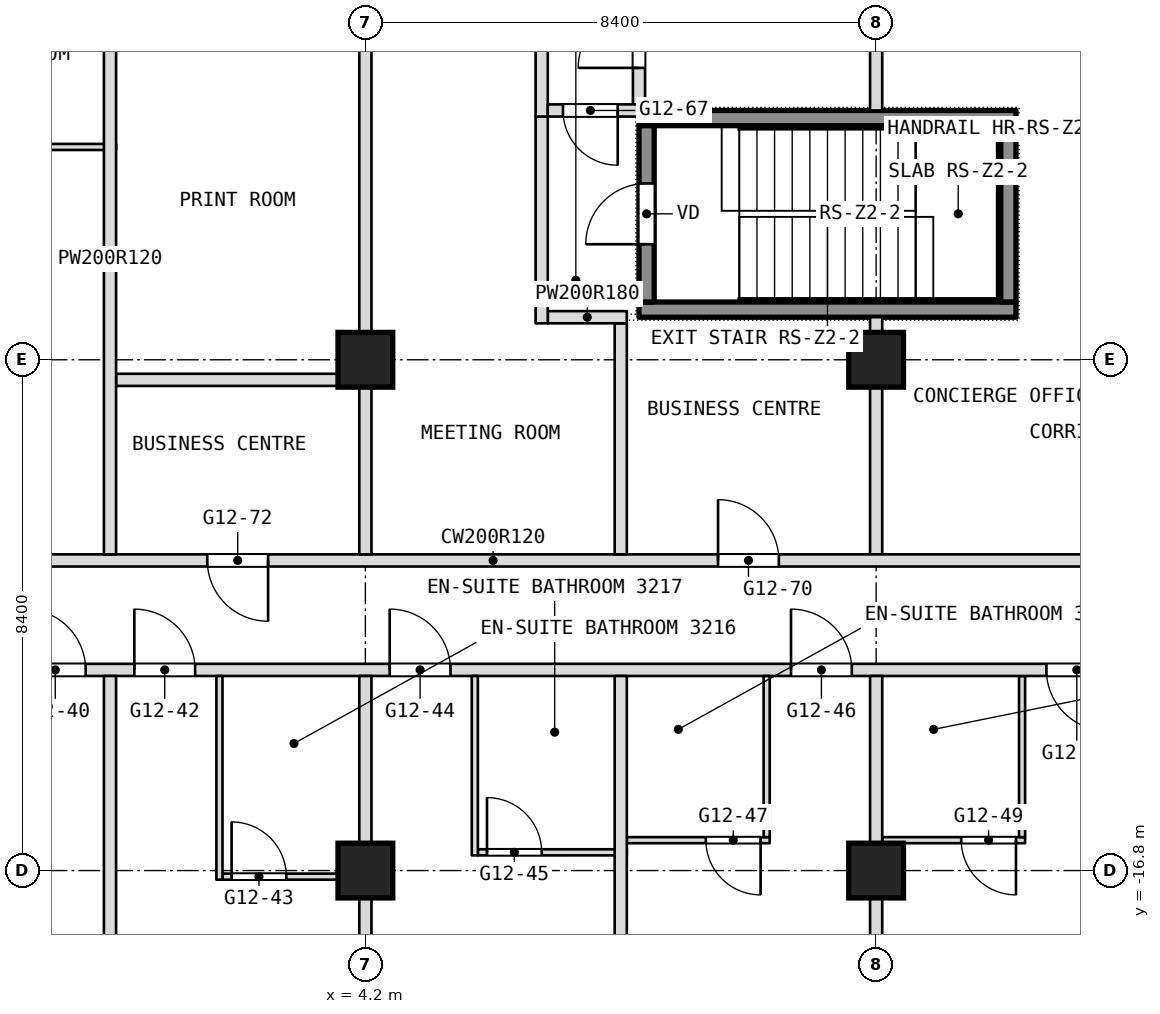
"""IFC4 building model, lengths in metres.
Left out: names, types, materials, properties, quantities, classifications, styles, units other than length and angle.
Written with IfcOpenShell. Run it as: python <this file> out.ifc"""

import sys

from ifc_helpers import new_model, si_unit, direction, frame, frame_2d, origin, origin_2d, place, context, subcontext, project, spatial, rectangle, extrude, element, fill, save


model = new_model("IFC4")
c1 = context("Model", 3, precision=1e-05, world=origin(), true_north=direction((0.0, 1.0)))
c2 = subcontext(c1, "Body", "Model", "MODEL_VIEW")
j1 = project(units=[si_unit("LENGTHUNIT", "METRE"), si_unit("PLANEANGLEUNIT", "RADIAN")], contexts=[c1])
p1 = place(None, origin())
s1 = spatial("IfcSite", under=j1, at=p1, CompositionType="ELEMENT")
p2 = place(p1, origin())
s2 = spatial("IfcBuilding", under=s1, at=p2, CompositionType="ELEMENT")
p3 = place(p2, frame((0.0, 0.0, 140.9)))
s3 = spatial("IfcBuildingStorey", under=s2, at=p3, CompositionType="ELEMENT", Elevation=140.9)
for number, where, z_axis, x_axis in (
    (1, (4.2, -16.8, 0.0), (0.0, 0.0, 1.0), (1.0, 0.0, 0.0)),
    (2, (4.2, -8.4, 0.0), (0.0, 0.0, 1.0), (1.0, 0.0, 0.0)),
    (3, (12.6, -16.8, 0.0), (0.0, 0.0, 1.0), (1.0, 0.0, 0.0)),
    (4, (12.6, -8.4, 0.0), (0.0, 0.0, 1.0), (1.0, 0.0, 0.0)),
):
    element("IfcColumn", number, at=place(p3, frame(where, z_axis=z_axis, x_axis=x_axis)), inside=s3, PredefinedType="COLUMN", context=c2, shape_type="SweptSolid", body=[
        extrude(rectangle(XDim=0.9, YDim=0.9, at=origin_2d()), origin(), (0.0, 0.0, 1.0), 3.6),
    ])
p4 = place(p3, frame((1.85, -16.9, 0.0), z_axis=(0.0, 0.0, 1.0), x_axis=(1.0, 0.0, 0.0)))
e5 = element("IfcWall", 5, at=p4, inside=s3, PredefinedType="PARTITIONING", context=c2, shape_type="SweptSolid", body=[
    extrude(rectangle(XDim=2.45, YDim=0.1, at=frame_2d((1.225, 0.0))), origin(), (0.0, 0.0, 1.0), 2.89),
])
p5 = place(p4, frame((0.15, 0.0, 0.0)))
e6 = element("IfcOpeningElement", 6, at=p5, cuts=e5, PredefinedType="OPENING", context=c2, shape_type="SweptSolid", body=[
    extrude(rectangle(XDim=0.9, YDim=2.1, at=frame_2d((0.45, 1.05))), frame((0.0, 0.05, 0.0), z_axis=(0.0, -1.0, 0.0), x_axis=(1.0, 0.0, 0.0)), (0.0, 0.0, 1.0), 0.1),
])
p6 = place(p3, frame((6.05, -16.5, 0.0), z_axis=(0.0, 0.0, 1.0), x_axis=(1.0, 0.0, 0.0)))
e7 = element("IfcWall", 7, at=p6, inside=s3, PredefinedType="PARTITIONING", context=c2, shape_type="SweptSolid", body=[
    extrude(rectangle(XDim=2.45, YDim=0.1, at=frame_2d((1.225, 0.0))), origin(), (0.0, 0.0, 1.0), 3.34),
])
p7 = place(p6, frame((0.15, 0.0, 0.0)))
e8 = element("IfcOpeningElement", 8, at=p7, cuts=e7, PredefinedType="OPENING", context=c2, shape_type="SweptSolid", body=[
    extrude(rectangle(XDim=0.9, YDim=2.1, at=frame_2d((0.45, 1.05))), frame((0.0, 0.05, 0.0), z_axis=(0.0, -1.0, 0.0), x_axis=(1.0, 0.0, 0.0)), (0.0, 0.0, 1.0), 0.1),
])
p8 = place(p3, frame((8.5, -16.3, 0.0), z_axis=(0.0, 0.0, 1.0), x_axis=(1.0, 0.0, 0.0)))
e9 = element("IfcWall", 9, at=p8, inside=s3, PredefinedType="PARTITIONING", context=c2, shape_type="SweptSolid", body=[
    extrude(rectangle(XDim=2.35, YDim=0.1, at=frame_2d((1.175, 0.0))), origin(), (0.0, 0.0, 1.0), 3.34),
])
p9 = place(p8, frame((1.3, 0.0, 0.0)))
e10 = element("IfcOpeningElement", 10, at=p9, cuts=e9, PredefinedType="OPENING", context=c2, shape_type="SweptSolid", body=[
    extrude(rectangle(XDim=0.9, YDim=2.1, at=frame_2d((0.45, 1.05))), frame((0.0, 0.05, 0.0), z_axis=(0.0, -1.0, 0.0), x_axis=(1.0, 0.0, 0.0)), (0.0, 0.0, 1.0), 0.1),
])
p10 = place(p3, frame((12.7, -16.3, 0.0), z_axis=(0.0, 0.0, 1.0), x_axis=(1.0, 0.0, 0.0)))
e11 = element("IfcWall", 11, at=p10, inside=s3, PredefinedType="PARTITIONING", context=c2, shape_type="SweptSolid", body=[
    extrude(rectangle(XDim=2.35, YDim=0.1, at=frame_2d((1.175, 0.0))), origin(), (0.0, 0.0, 1.0), 3.34),
])
p11 = place(p10, frame((1.3, 0.0, 0.0)))
e12 = element("IfcOpeningElement", 12, at=p11, cuts=e11, PredefinedType="OPENING", context=c2, shape_type="SweptSolid", body=[
    extrude(rectangle(XDim=0.9, YDim=2.1, at=frame_2d((0.45, 1.05))), frame((0.0, 0.05, 0.0), z_axis=(0.0, -1.0, 0.0), x_axis=(1.0, 0.0, 0.0)), (0.0, 0.0, 1.0), 0.1),
])
p12 = place(p3, frame((15.0, -16.25, 0.0), z_axis=(0.0, 0.0, 1.0), x_axis=(0.0, 1.0, 0.0)))
e13 = element("IfcWall", 13, at=p12, inside=s3, PredefinedType="PARTITIONING", context=c2, shape_type="SweptSolid", body=[
    extrude(rectangle(XDim=2.65, YDim=0.1, at=frame_2d((1.325, 0.0))), origin(), (0.0, 0.0, 1.0), 3.34),
])
p13 = place(p3, frame((-3.2, -13.5, 0.0), z_axis=(0.0, 0.0, 1.0), x_axis=(1.0, 0.0, 0.0)))
e14 = element("IfcWall", 14, at=p13, inside=s3, PredefinedType="PARTITIONING", context=c2, shape_type="SweptSolid", body=[
    extrude(rectangle(XDim=19.9, YDim=0.2, at=frame_2d((9.95, 0.0))), origin(), (0.0, 0.0, 1.0), 3.34),
])
p14 = place(p13, frame((1.8, 0.0, 0.0)))
e15 = element("IfcOpeningElement", 15, at=p14, cuts=e14, PredefinedType="OPENING", context=c2, shape_type="SweptSolid", body=[
    extrude(rectangle(XDim=1.0, YDim=2.1, at=frame_2d((0.5, 1.05))), frame((0.0, 0.1, 0.0), z_axis=(0.0, -1.0, 0.0), x_axis=(1.0, 0.0, 0.0)), (0.0, 0.0, 1.0), 0.2),
])
p15 = place(p13, frame((3.6, 0.0, 0.0)))
e16 = element("IfcOpeningElement", 16, at=p15, cuts=e14, PredefinedType="OPENING", context=c2, shape_type="SweptSolid", body=[
    extrude(rectangle(XDim=1.0, YDim=2.1, at=frame_2d((0.5, 1.05))), frame((0.0, 0.1, 0.0), z_axis=(0.0, -1.0, 0.0), x_axis=(1.0, 0.0, 0.0)), (0.0, 0.0, 1.0), 0.2),
])
p16 = place(p13, frame((7.8, 0.0, 0.0)))
e17 = element("IfcOpeningElement", 17, at=p16, cuts=e14, PredefinedType="OPENING", context=c2, shape_type="SweptSolid", body=[
    extrude(rectangle(XDim=1.0, YDim=2.1, at=frame_2d((0.5, 1.05))), frame((0.0, 0.1, 0.0), z_axis=(0.0, -1.0, 0.0), x_axis=(1.0, 0.0, 0.0)), (0.0, 0.0, 1.0), 0.2),
])
p17 = place(p13, frame((14.4, 0.0, 0.0)))
e18 = element("IfcOpeningElement", 18, at=p17, cuts=e14, PredefinedType="OPENING", context=c2, shape_type="SweptSolid", body=[
    extrude(rectangle(XDim=1.0, YDim=2.1, at=frame_2d((0.5, 1.05))), frame((0.0, 0.1, 0.0), z_axis=(0.0, -1.0, 0.0), x_axis=(1.0, 0.0, 0.0)), (0.0, 0.0, 1.0), 0.2),
])
p18 = place(p13, frame((18.6, 0.0, 0.0)))
e19 = element("IfcOpeningElement", 19, at=p18, cuts=e14, PredefinedType="OPENING", context=c2, shape_type="SweptSolid", body=[
    extrude(rectangle(XDim=1.0, YDim=2.1, at=frame_2d((0.5, 1.05))), frame((0.0, 0.1, 0.0), z_axis=(0.0, -1.0, 0.0), x_axis=(1.0, 0.0, 0.0)), (0.0, 0.0, 1.0), 0.2),
])
p19 = place(p3, frame((12.6, -21.175, 0.0), z_axis=(0.0, 0.0, 1.0), x_axis=(0.0, 1.0, 0.0)))
e20 = element("IfcWall", 20, at=p19, inside=s3, PredefinedType="PARTITIONING", context=c2, shape_type="SweptSolid", body=[
    extrude(rectangle(XDim=7.575, YDim=0.2, at=frame_2d((3.788, 0.0))), origin(), (0.0, 0.0, 1.0), 3.34),
])
p20 = place(p3, frame((12.6, -11.6, 0.0), z_axis=(0.0, 0.0, 1.0), x_axis=(0.0, 1.0, 0.0)))
e21 = element("IfcWall", 21, at=p20, inside=s3, PredefinedType="PARTITIONING", context=c2, shape_type="SweptSolid", body=[
    extrude(rectangle(XDim=3.9, YDim=0.2, at=frame_2d((1.95, 0.0))), origin(), (0.0, 0.0, 1.0), 3.34),
])
p21 = place(p3, frame((12.6, -4.3, 0.0), z_axis=(0.0, 0.0, 1.0), x_axis=(0.0, 1.0, 0.0)))
e22 = element("IfcWall", 22, at=p21, inside=s3, PredefinedType="PARTITIONING", context=c2, shape_type="SweptSolid", body=[
    extrude(rectangle(XDim=2.4, YDim=0.2, at=frame_2d((1.2, 0.0))), origin(), (0.0, 0.0, 1.0), 3.34),
])
p22 = place(p3, frame((-4.1, -11.7, 0.0), z_axis=(0.0, 0.0, 1.0), x_axis=(1.0, 0.0, 0.0)))
e23 = element("IfcWall", 23, at=p22, inside=s3, PredefinedType="PARTITIONING", context=c2, shape_type="SweptSolid", body=[
    extrude(rectangle(XDim=20.8, YDim=0.2, at=frame_2d((10.4, 0.0))), origin(), (0.0, 0.0, 1.0), 3.34),
])
p23 = place(p22, frame((14.1, 0.0, 0.0)))
e24 = element("IfcOpeningElement", 24, at=p23, cuts=e23, PredefinedType="OPENING", context=c2, shape_type="SweptSolid", body=[
    extrude(rectangle(XDim=1.0, YDim=2.1, at=frame_2d((0.5, 1.05))), frame((0.0, 0.1, 0.0), z_axis=(0.0, -1.0, 0.0), x_axis=(1.0, 0.0, 0.0)), (0.0, 0.0, 1.0), 0.2),
])
p24 = place(p22, frame((5.7, 0.0, 0.0)))
e25 = element("IfcOpeningElement", 25, at=p24, cuts=e23, PredefinedType="OPENING", context=c2, shape_type="SweptSolid", body=[
    extrude(rectangle(XDim=1.0, YDim=2.1, at=frame_2d((0.5, 1.05))), frame((0.0, 0.1, 0.0), z_axis=(0.0, -1.0, 0.0), x_axis=(1.0, 0.0, 0.0)), (0.0, 0.0, 1.0), 0.2),
])
p25 = place(p3, frame((10.8, -16.25, 0.0), z_axis=(0.0, 0.0, 1.0), x_axis=(0.0, 1.0, 0.0)))
e26 = element("IfcWall", 26, at=p25, inside=s3, PredefinedType="PARTITIONING", context=c2, shape_type="SweptSolid", body=[
    extrude(rectangle(XDim=2.65, YDim=0.1, at=frame_2d((1.325, 0.0))), origin(), (0.0, 0.0, 1.0), 3.34),
])
p26 = place(p3, frame((0.1, -8.73, 0.0), z_axis=(0.0, 0.0, 1.0), x_axis=(1.0, 0.0, 0.0)))
e27 = element("IfcWall", 27, at=p26, inside=s3, PredefinedType="PARTITIONING", context=c2, shape_type="SweptSolid", body=[
    extrude(rectangle(XDim=4.0, YDim=0.2, at=frame_2d((2.0, 0.0))), origin(), (0.0, 0.0, 1.0), 3.34),
])
p27 = place(p3, frame((8.7, -4.3, 0.0), z_axis=(0.0, 0.0, 1.0), x_axis=(0.0, 1.0, 0.0)))
e28 = element("IfcWall", 28, at=p27, inside=s3, PredefinedType="PARTITIONING", context=c2, shape_type="SweptSolid", body=[
    extrude(rectangle(XDim=2.4, YDim=0.2, at=frame_2d((1.2, 0.0))), origin(), (0.0, 0.0, 1.0), 3.34),
])
p28 = place(p27, frame((0.7, 0.0, 0.0)))
e29 = element("IfcOpeningElement", 29, at=p28, cuts=e28, PredefinedType="OPENING", context=c2, shape_type="SweptSolid", body=[
    extrude(rectangle(XDim=1.0, YDim=2.1, at=frame_2d((0.5, 1.05))), frame((0.0, 0.1, 0.0), z_axis=(0.0, -1.0, 0.0), x_axis=(1.0, 0.0, 0.0)), (0.0, 0.0, 1.0), 0.2),
])
p29 = place(p3, frame((8.4, -23.3, 0.0), z_axis=(0.0, 0.0, 1.0), x_axis=(0.0, 1.0, 0.0)))
e30 = element("IfcWall", 30, at=p29, inside=s3, PredefinedType="PARTITIONING", context=c2, shape_type="SweptSolid", body=[
    extrude(rectangle(XDim=9.7, YDim=0.2, at=frame_2d((4.85, 0.0))), origin(), (0.0, 0.0, 1.0), 3.34),
])
p30 = place(p3, frame((8.4, -11.6, 0.0), z_axis=(0.0, 0.0, 1.0), x_axis=(0.0, 1.0, 0.0)))
e31 = element("IfcWall", 31, at=p30, inside=s3, PredefinedType="PARTITIONING", context=c2, shape_type="SweptSolid", body=[
    extrude(rectangle(XDim=3.8, YDim=0.2, at=frame_2d((1.9, 0.0))), origin(), (0.0, 0.0, 1.0), 3.34),
])
p31 = place(p3, frame((7.2, -7.7, 0.0), z_axis=(0.0, 0.0, 1.0), x_axis=(1.0, 0.0, 0.0)))
e32 = element("IfcWall", 32, at=p31, inside=s3, PredefinedType="PARTITIONING", context=c2, shape_type="SweptSolid", body=[
    extrude(rectangle(XDim=1.3, YDim=0.2, at=frame_2d((0.65, 0.0))), origin(), (0.0, 0.0, 1.0), 3.34),
])
p32 = place(p3, frame((7.1, -7.8, 0.0), z_axis=(0.0, 0.0, 1.0), x_axis=(0.0, 1.0, 0.0)))
e33 = element("IfcWall", 33, at=p32, inside=s3, PredefinedType="PARTITIONING", context=c2, shape_type="SweptSolid", body=[
    extrude(rectangle(XDim=3.4, YDim=0.2, at=frame_2d((1.7, 0.0))), origin(), (0.0, 0.0, 1.0), 3.34),
])
p33 = place(p3, frame((7.1, -4.4, 0.0), z_axis=(0.0, 0.0, 1.0), x_axis=(0.0, 1.0, 0.0)))
e34 = element("IfcWall", 34, at=p33, inside=s3, PredefinedType="PARTITIONING", context=c2, shape_type="SweptSolid", body=[
    extrude(rectangle(XDim=2.7, YDim=0.2, at=frame_2d((1.35, 0.0))), origin(), (0.0, 0.0, 1.0), 3.34),
])
p34 = place(p3, frame((6.0, -16.55, 0.0), z_axis=(0.0, 0.0, 1.0), x_axis=(0.0, 1.0, 0.0)))
e35 = element("IfcWall", 35, at=p34, inside=s3, PredefinedType="PARTITIONING", context=c2, shape_type="SweptSolid", body=[
    extrude(rectangle(XDim=2.95, YDim=0.1, at=frame_2d((1.475, 0.0))), origin(), (0.0, 0.0, 1.0), 3.34),
])
p35 = place(p3, frame((-4.1, -4.9, 0.0), z_axis=(0.0, 0.0, 1.0), x_axis=(1.0, 0.0, 0.0)))
e36 = element("IfcWall", 36, at=p35, inside=s3, PredefinedType="PARTITIONING", context=c2, shape_type="SweptSolid", body=[
    extrude(rectangle(XDim=4.2, YDim=0.1, at=frame_2d((2.1, 0.0))), origin(), (0.0, 0.0, 1.0), 3.34),
])
p36 = place(p35, frame((1.55, 0.0, 0.0)))
e37 = element("IfcOpeningElement", 37, at=p36, cuts=e36, PredefinedType="OPENING", context=c2, shape_type="SweptSolid", body=[
    extrude(rectangle(XDim=0.9, YDim=2.1, at=frame_2d((0.45, 1.05))), frame((0.0, 0.05, 0.0), z_axis=(0.0, -1.0, 0.0), x_axis=(1.0, 0.0, 0.0)), (0.0, 0.0, 1.0), 0.1),
])
p37 = place(p3, frame((7.2, -4.3, 0.0), z_axis=(0.0, 0.0, 1.0), x_axis=(1.0, 0.0, 0.0)))
e38 = element("IfcWall", 38, at=p37, inside=s3, PredefinedType="PARTITIONING", context=c2, shape_type="SweptSolid", body=[
    extrude(rectangle(XDim=1.5, YDim=0.2, at=frame_2d((0.75, 0.0))), origin(), (0.0, 0.0, 1.0), 3.34),
])
p38 = place(p37, frame((0.25, 0.0, 0.0)))
e39 = element("IfcOpeningElement", 39, at=p38, cuts=e38, PredefinedType="OPENING", context=c2, shape_type="SweptSolid", body=[
    extrude(rectangle(XDim=0.9, YDim=2.1, at=frame_2d((0.45, 1.05))), frame((0.0, 0.1, 0.0), z_axis=(0.0, -1.0, 0.0), x_axis=(1.0, 0.0, 0.0)), (0.0, 0.0, 1.0), 0.2),
])
p39 = place(p3, frame((4.2, -23.3, 0.0), z_axis=(0.0, 0.0, 1.0), x_axis=(0.0, 1.0, 0.0)))
e40 = element("IfcWall", 40, at=p39, inside=s3, PredefinedType="PARTITIONING", context=c2, shape_type="SweptSolid", body=[
    extrude(rectangle(XDim=9.7, YDim=0.2, at=frame_2d((4.85, 0.0))), origin(), (0.0, 0.0, 1.0), 3.34),
])
p40 = place(p3, frame((4.2, -11.6, 0.0), z_axis=(0.0, 0.0, 1.0), x_axis=(0.0, 1.0, 0.0)))
e41 = element("IfcWall", 41, at=p40, inside=s3, PredefinedType="PARTITIONING", context=c2, shape_type="SweptSolid", body=[
    extrude(rectangle(XDim=9.7, YDim=0.2, at=frame_2d((4.85, 0.0))), origin(), (0.0, 0.0, 1.0), 3.34),
])
p41 = place(p3, frame((1.8, -16.95, 0.0), z_axis=(0.0, 0.0, 1.0), x_axis=(0.0, 1.0, 0.0)))
e42 = element("IfcWall", 42, at=p41, inside=s3, PredefinedType="PARTITIONING", context=c2, shape_type="SweptSolid", body=[
    extrude(rectangle(XDim=3.35, YDim=0.1, at=frame_2d((1.675, 0.0))), origin(), (0.0, 0.0, 1.0), 3.34),
])
p42 = place(p3, frame((0.0, -23.3, 0.0), z_axis=(0.0, 0.0, 1.0), x_axis=(0.0, 1.0, 0.0)))
e43 = element("IfcWall", 43, at=p42, inside=s3, PredefinedType="PARTITIONING", context=c2, shape_type="SweptSolid", body=[
    extrude(rectangle(XDim=9.7, YDim=0.2, at=frame_2d((4.85, 0.0))), origin(), (0.0, 0.0, 1.0), 3.34),
])
p43 = place(p3, frame((0.0, -11.6, 0.0), z_axis=(0.0, 0.0, 1.0), x_axis=(0.0, 1.0, 0.0)))
e44 = element("IfcWall", 44, at=p43, inside=s3, PredefinedType="PARTITIONING", context=c2, shape_type="SweptSolid", body=[
    extrude(rectangle(XDim=9.7, YDim=0.2, at=frame_2d((4.85, 0.0))), origin(), (0.0, 0.0, 1.0), 3.34),
])
for number, where, z_axis, x_axis in (
    (45, (8.7, -7.575, 0.1), (0.0, 0.0, 1.0), (1.0, 0.0, 0.0)),
    (46, (8.7, -4.425, 0.1), (0.0, 0.0, 1.0), (1.0, 0.0, 0.0)),
):
    element("IfcWall", number, at=place(p3, frame(where, z_axis=z_axis, x_axis=x_axis)), inside=s3, PredefinedType="SHEAR", context=c2, shape_type="SweptSolid", body=[
        extrude(rectangle(XDim=6.2, YDim=0.25, at=frame_2d((3.1, 0.0))), origin(), (0.0, 0.0, 1.0), 3.6),
    ])
p44 = place(p3, frame((8.825, -7.45, 0.1), z_axis=(0.0, 0.0, 1.0), x_axis=(0.0, 1.0, 0.0)))
e47 = element("IfcWall", 47, at=p44, inside=s3, PredefinedType="SHEAR", context=c2, shape_type="SweptSolid", body=[
    extrude(rectangle(XDim=2.9, YDim=0.25, at=frame_2d((1.45, 0.0))), origin(), (0.0, 0.0, 1.0), 3.6),
])
p45 = place(p44, frame((0.95, 0.0, 0.0)))
e48 = element("IfcOpeningElement", 48, at=p45, cuts=e47, PredefinedType="OPENING", context=c2, shape_type="SweptSolid", body=[
    extrude(rectangle(XDim=1.0, YDim=2.1, at=frame_2d((0.5, 1.05))), frame((0.0, 0.125, 0.0), z_axis=(0.0, -1.0, 0.0), x_axis=(1.0, 0.0, 0.0)), (0.0, 0.0, 1.0), 0.25),
])
p46 = place(p3, frame((14.775, -7.45, 0.1), z_axis=(0.0, 0.0, 1.0), x_axis=(0.0, 1.0, 0.0)))
e49 = element("IfcWall", 49, at=p46, inside=s3, PredefinedType="SHEAR", context=c2, shape_type="SweptSolid", body=[
    extrude(rectangle(XDim=2.9, YDim=0.25, at=frame_2d((1.45, 0.0))), origin(), (0.0, 0.0, 1.0), 3.6),
])
p47 = place(p5, origin())
e50 = element("IfcDoor", 50, at=p47, inside=s3, OperationType="SINGLE_SWING_LEFT", PredefinedType="DOOR", context=c2, shape_type="SweptSolid", body=[
    extrude(rectangle(XDim=0.9, YDim=2.1, at=frame_2d((0.45, 1.05))), frame((0.0, 0.025, 0.0), z_axis=(0.0, -1.0, 0.0), x_axis=(1.0, 0.0, 0.0)), (0.0, 0.0, 1.0), 0.05),
])
fill(e6, e50)
p48 = place(p7, origin())
e51 = element("IfcDoor", 51, at=p48, inside=s3, OperationType="SINGLE_SWING_LEFT", PredefinedType="DOOR", context=c2, shape_type="SweptSolid", body=[
    extrude(rectangle(XDim=0.9, YDim=2.1, at=frame_2d((0.45, 1.05))), frame((0.0, 0.025, 0.0), z_axis=(0.0, -1.0, 0.0), x_axis=(1.0, 0.0, 0.0)), (0.0, 0.0, 1.0), 0.05),
])
fill(e8, e51)
p49 = place(p9, origin())
e52 = element("IfcDoor", 52, at=p49, inside=s3, OperationType="SINGLE_SWING_RIGHT", PredefinedType="DOOR", context=c2, shape_type="SweptSolid", body=[
    extrude(rectangle(XDim=0.9, YDim=2.1, at=frame_2d((0.45, 1.05))), frame((0.0, 0.025, 0.0), z_axis=(0.0, -1.0, 0.0), x_axis=(1.0, 0.0, 0.0)), (0.0, 0.0, 1.0), 0.05),
])
fill(e10, e52)
p50 = place(p11, origin())
e53 = element("IfcDoor", 53, at=p50, inside=s3, OperationType="SINGLE_SWING_RIGHT", PredefinedType="DOOR", context=c2, shape_type="SweptSolid", body=[
    extrude(rectangle(XDim=0.9, YDim=2.1, at=frame_2d((0.45, 1.05))), frame((0.0, 0.025, 0.0), z_axis=(0.0, -1.0, 0.0), x_axis=(1.0, 0.0, 0.0)), (0.0, 0.0, 1.0), 0.05),
])
fill(e12, e53)
p51 = place(p14, origin())
e54 = element("IfcDoor", 54, at=p51, inside=s3, OperationType="SINGLE_SWING_RIGHT", PredefinedType="DOOR", context=c2, shape_type="SweptSolid", body=[
    extrude(rectangle(XDim=1.0, YDim=2.1, at=frame_2d((0.5, 1.05))), frame((0.0, 0.025, 0.0), z_axis=(0.0, -1.0, 0.0), x_axis=(1.0, 0.0, 0.0)), (0.0, 0.0, 1.0), 0.05),
])
fill(e15, e54)
p52 = place(p15, origin())
e55 = element("IfcDoor", 55, at=p52, inside=s3, OperationType="SINGLE_SWING_RIGHT", PredefinedType="DOOR", context=c2, shape_type="SweptSolid", body=[
    extrude(rectangle(XDim=1.0, YDim=2.1, at=frame_2d((0.5, 1.05))), frame((0.0, 0.025, 0.0), z_axis=(0.0, -1.0, 0.0), x_axis=(1.0, 0.0, 0.0)), (0.0, 0.0, 1.0), 0.05),
])
fill(e16, e55)
p53 = place(p16, origin())
e56 = element("IfcDoor", 56, at=p53, inside=s3, OperationType="SINGLE_SWING_RIGHT", PredefinedType="DOOR", context=c2, shape_type="SweptSolid", body=[
    extrude(rectangle(XDim=1.0, YDim=2.1, at=frame_2d((0.5, 1.05))), frame((0.0, 0.025, 0.0), z_axis=(0.0, -1.0, 0.0), x_axis=(1.0, 0.0, 0.0)), (0.0, 0.0, 1.0), 0.05),
])
fill(e17, e56)
p54 = place(p17, origin())
e57 = element("IfcDoor", 57, at=p54, inside=s3, OperationType="SINGLE_SWING_RIGHT", PredefinedType="DOOR", context=c2, shape_type="SweptSolid", body=[
    extrude(rectangle(XDim=1.0, YDim=2.1, at=frame_2d((0.5, 1.05))), frame((0.0, 0.025, 0.0), z_axis=(0.0, -1.0, 0.0), x_axis=(1.0, 0.0, 0.0)), (0.0, 0.0, 1.0), 0.05),
])
fill(e18, e57)
p55 = place(p18, origin())
e58 = element("IfcDoor", 58, at=p55, inside=s3, OperationType="SINGLE_SWING_LEFT", PredefinedType="DOOR", context=c2, shape_type="SweptSolid", body=[
    extrude(rectangle(XDim=1.0, YDim=2.1, at=frame_2d((0.5, 1.05))), frame((0.0, 0.025, 0.0), z_axis=(0.0, -1.0, 0.0), x_axis=(1.0, 0.0, 0.0)), (0.0, 0.0, 1.0), 0.05),
])
fill(e19, e58)
p56 = place(p23, origin())
e59 = element("IfcDoor", 59, at=p56, inside=s3, OperationType="SINGLE_SWING_RIGHT", PredefinedType="DOOR", context=c2, shape_type="SweptSolid", body=[
    extrude(rectangle(XDim=1.0, YDim=2.1, at=frame_2d((0.5, 1.05))), frame((0.0, 0.025, 0.0), z_axis=(0.0, -1.0, 0.0), x_axis=(1.0, 0.0, 0.0)), (0.0, 0.0, 1.0), 0.05),
])
fill(e24, e59)
p57 = place(p24, origin())
e60 = element("IfcDoor", 60, at=p57, inside=s3, OperationType="SINGLE_SWING_RIGHT", PredefinedType="DOOR", context=c2, shape_type="SweptSolid", body=[
    extrude(rectangle(XDim=1.0, YDim=2.1, at=frame_2d((0.5, 1.05))), frame((0.0, 0.025, 0.0), z_axis=(0.0, -1.0, 0.0), x_axis=(1.0, 0.0, 0.0)), (0.0, 0.0, 1.0), 0.05),
])
fill(e25, e60)
p58 = place(p28, origin())
e61 = element("IfcDoor", 61, at=p58, inside=s3, OperationType="SINGLE_SWING_LEFT", PredefinedType="DOOR", context=c2, shape_type="SweptSolid", body=[
    extrude(rectangle(XDim=1.0, YDim=2.1, at=frame_2d((0.5, 1.05))), frame((0.0, 0.025, 0.0), z_axis=(0.0, -1.0, 0.0), x_axis=(1.0, 0.0, 0.0)), (0.0, 0.0, 1.0), 0.05),
])
fill(e29, e61)
p59 = place(p38, origin())
e62 = element("IfcDoor", 62, at=p59, inside=s3, OperationType="SINGLE_SWING_LEFT", PredefinedType="DOOR", context=c2, shape_type="SweptSolid", body=[
    extrude(rectangle(XDim=0.9, YDim=2.1, at=frame_2d((0.45, 1.05))), frame((0.0, 0.025, 0.0), z_axis=(0.0, -1.0, 0.0), x_axis=(1.0, 0.0, 0.0)), (0.0, 0.0, 1.0), 0.05),
])
fill(e39, e62)
p60 = place(p45, origin())
e63 = element("IfcDoor", 63, at=p60, inside=s3, OperationType="SINGLE_SWING_LEFT", PredefinedType="DOOR", context=c2, shape_type="SweptSolid", body=[
    extrude(rectangle(XDim=1.0, YDim=2.1, at=frame_2d((0.5, 1.05))), frame((0.0, 0.025, 0.0), z_axis=(0.0, -1.0, 0.0), x_axis=(1.0, 0.0, 0.0)), (0.0, 0.0, 1.0), 0.05),
])
fill(e48, e63)
save(model, sys.argv[1])
